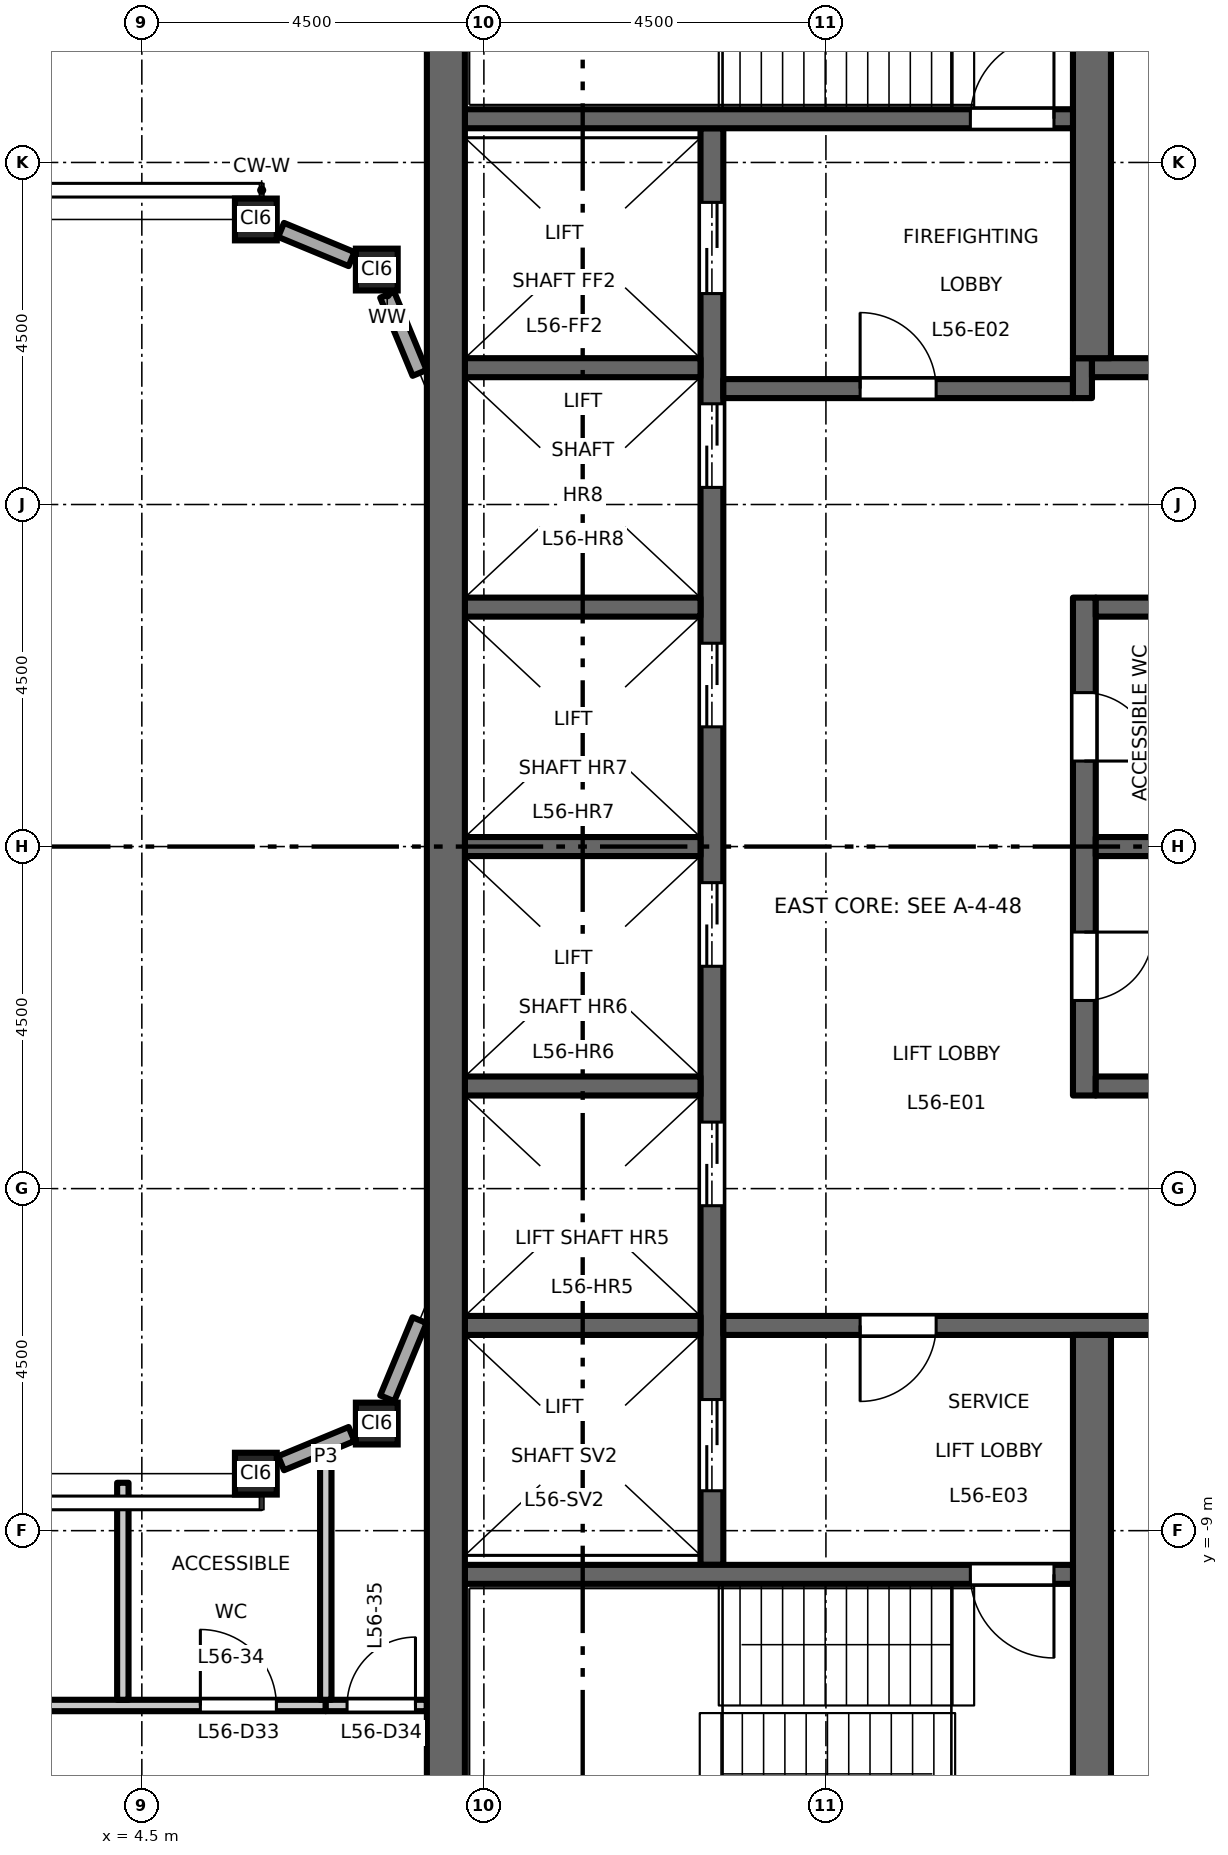
"""IFC4 building model, lengths in metres.
Left out: names, types, materials, properties, quantities, classifications, styles, units other than length and angle.
Written with IfcOpenShell. Run it as: python <this file> out.ifc"""

import sys

from ifc_helpers import new_model, si_unit, direction, frame, frame_2d, origin, origin_2d, place, context, subcontext, project, spatial, rectangle, hollow_rectangle, extrude, element, fill, save


model = new_model("IFC4")
c1 = context("Model", 3, precision=1e-05, world=origin(), true_north=direction((0.0, 1.0)))
c2 = subcontext(c1, "Body", "Model", "MODEL_VIEW")
j1 = project(units=[si_unit("LENGTHUNIT", "METRE"), si_unit("PLANEANGLEUNIT", "RADIAN")], contexts=[c1])
p1 = place(None, origin())
s1 = spatial("IfcSite", under=j1, at=p1, CompositionType="ELEMENT")
p2 = place(p1, origin())
s2 = spatial("IfcBuilding", under=s1, at=p2, CompositionType="ELEMENT")
p3 = place(p2, frame((0.0, 0.0, 260.2)))
s3 = spatial("IfcBuildingStorey", under=s2, at=p3, CompositionType="ELEMENT", Elevation=260.2)
for number, where, z_axis, x_axis in (
    (1, (6.0, -8.25, 0.0), (0.0, 0.0, 1.0), (1.0, 0.0, 0.0)),
    (2, (7.591, -7.591, 0.0), (0.0, 0.0, 1.0), (1.0, 0.0, 0.0)),
    (3, (6.0, 8.25, 0.0), (0.0, 0.0, 1.0), (1.0, 0.0, 0.0)),
    (4, (7.591, 7.591, 0.0), (0.0, 0.0, 1.0), (1.0, 0.0, 0.0)),
):
    element("IfcColumn", number, at=place(p3, frame(where, z_axis=z_axis, x_axis=x_axis)), inside=s3, PredefinedType="COLUMN", context=c2, shape_type="SweptSolid", body=[
        extrude(hollow_rectangle(XDim=0.55, YDim=0.55, WallThickness=0.028, at=origin_2d()), origin(), (0.0, 0.0, 1.0), 4.5),
    ])
p4 = place(p3, frame((12.0, -9.45, 0.0), z_axis=(0.0, 0.0, 1.0), x_axis=(0.0, 1.0, 0.0)))
e5 = element("IfcWall", 5, at=p4, inside=s3, PredefinedType="SHEAR", context=c2, shape_type="SweptSolid", body=[
    extrude(rectangle(XDim=18.9, YDim=0.3, at=frame_2d((9.45, 0.0))), origin(), (0.0, 0.0, 1.0), 4.35),
])
p5 = place(p4, frame((4.725, 0.0, 0.0)))
e6 = element("IfcOpeningElement", 6, at=p5, cuts=e5, PredefinedType="OPENING", context=c2, shape_type="SweptSolid", body=[
    extrude(rectangle(XDim=1.1, YDim=2.1, at=frame_2d((0.55, 1.05))), frame((0.0, 0.16, 0.0), z_axis=(0.0, -1.0, 0.0), x_axis=(1.0, 0.0, 0.0)), (0.0, 0.0, 1.0), 0.32),
])
p6 = place(p4, frame((7.875, 0.0, 0.0)))
e7 = element("IfcOpeningElement", 7, at=p6, cuts=e5, PredefinedType="OPENING", context=c2, shape_type="SweptSolid", body=[
    extrude(rectangle(XDim=1.1, YDim=2.1, at=frame_2d((0.55, 1.05))), frame((0.0, 0.16, 0.0), z_axis=(0.0, -1.0, 0.0), x_axis=(1.0, 0.0, 0.0)), (0.0, 0.0, 1.0), 0.32),
])
p7 = place(p4, frame((11.025, 0.0, 0.0)))
e8 = element("IfcOpeningElement", 8, at=p7, cuts=e5, PredefinedType="OPENING", context=c2, shape_type="SweptSolid", body=[
    extrude(rectangle(XDim=1.1, YDim=2.1, at=frame_2d((0.55, 1.05))), frame((0.0, 0.16, 0.0), z_axis=(0.0, -1.0, 0.0), x_axis=(1.0, 0.0, 0.0)), (0.0, 0.0, 1.0), 0.32),
])
p8 = place(p4, frame((14.175, 0.0, 0.0)))
e9 = element("IfcOpeningElement", 9, at=p8, cuts=e5, PredefinedType="OPENING", context=c2, shape_type="SweptSolid", body=[
    extrude(rectangle(XDim=1.1, YDim=2.1, at=frame_2d((0.55, 1.05))), frame((0.0, 0.16, 0.0), z_axis=(0.0, -1.0, 0.0), x_axis=(1.0, 0.0, 0.0)), (0.0, 0.0, 1.0), 0.32),
])
p9 = place(p4, frame((16.725, 0.0, 0.0)))
e10 = element("IfcOpeningElement", 10, at=p9, cuts=e5, PredefinedType="OPENING", context=c2, shape_type="SweptSolid", body=[
    extrude(rectangle(XDim=1.2, YDim=2.1, at=frame_2d((0.6, 1.05))), frame((0.0, 0.16, 0.0), z_axis=(0.0, -1.0, 0.0), x_axis=(1.0, 0.0, 0.0)), (0.0, 0.0, 1.0), 0.32),
])
p10 = place(p4, frame((0.975, 0.0, 0.0)))
e11 = element("IfcOpeningElement", 11, at=p10, cuts=e5, PredefinedType="OPENING", context=c2, shape_type="SweptSolid", body=[
    extrude(rectangle(XDim=1.2, YDim=2.1, at=frame_2d((0.6, 1.05))), frame((0.0, 0.16, 0.0), z_axis=(0.0, -1.0, 0.0), x_axis=(1.0, 0.0, 0.0)), (0.0, 0.0, 1.0), 0.32),
])
p11 = place(p3, frame((12.15, 6.025, 0.0), z_axis=(0.0, 0.0, 1.0), x_axis=(1.0, 0.0, 0.0)))
e12 = element("IfcWall", 12, at=p11, inside=s3, PredefinedType="SHEAR", context=c2, shape_type="SweptSolid", body=[
    extrude(rectangle(XDim=4.6, YDim=0.25, at=frame_2d((2.3, 0.0))), origin(), (0.0, 0.0, 1.0), 4.35),
])
p12 = place(p11, frame((1.8, 0.0, 0.0)))
e13 = element("IfcOpeningElement", 13, at=p12, cuts=e12, PredefinedType="OPENING", context=c2, shape_type="SweptSolid", body=[
    extrude(rectangle(XDim=1.0, YDim=2.1, at=frame_2d((0.5, 1.05))), frame((0.0, 0.135, 0.0), z_axis=(0.0, -1.0, 0.0), x_axis=(1.0, 0.0, 0.0)), (0.0, 0.0, 1.0), 0.27),
])
p13 = place(p3, frame((16.875, 5.9, 0.0), z_axis=(0.0, 0.0, 1.0), x_axis=(0.0, 1.0, 0.0)))
e14 = element("IfcWall", 14, at=p13, inside=s3, PredefinedType="SHEAR", context=c2, shape_type="SweptSolid", body=[
    extrude(rectangle(XDim=0.525, YDim=0.25, at=frame_2d((0.263, 0.0))), origin(), (0.0, 0.0, 1.0), 4.35),
])
p14 = place(p3, frame((17.0, 6.3, 0.0), z_axis=(0.0, 0.0, 1.0), x_axis=(1.0, 0.0, 0.0)))
e15 = element("IfcWall", 15, at=p14, inside=s3, PredefinedType="SHEAR", context=c2, shape_type="SweptSolid", body=[
    extrude(rectangle(XDim=4.25, YDim=0.25, at=frame_2d((2.125, 0.0))), origin(), (0.0, 0.0, 1.0), 4.35),
])
p15 = place(p3, frame((12.15, -6.3, 0.0), z_axis=(0.0, 0.0, 1.0), x_axis=(1.0, 0.0, 0.0)))
e16 = element("IfcWall", 16, at=p15, inside=s3, PredefinedType="SHEAR", context=c2, shape_type="SweptSolid", body=[
    extrude(rectangle(XDim=9.1, YDim=0.25, at=frame_2d((4.55, 0.0))), origin(), (0.0, 0.0, 1.0), 4.35),
])
p16 = place(p15, frame((1.8, 0.0, 0.0)))
e17 = element("IfcOpeningElement", 17, at=p16, cuts=e16, PredefinedType="OPENING", context=c2, shape_type="SweptSolid", body=[
    extrude(rectangle(XDim=1.0, YDim=2.1, at=frame_2d((0.5, 1.05))), frame((0.0, 0.135, 0.0), z_axis=(0.0, -1.0, 0.0), x_axis=(1.0, 0.0, 0.0)), (0.0, 0.0, 1.0), 0.27),
])
p17 = place(p3, frame((16.9, -3.275, 0.0), z_axis=(0.0, 0.0, 1.0), x_axis=(0.0, 1.0, 0.0)))
e18 = element("IfcWall", 18, at=p17, inside=s3, PredefinedType="SHEAR", context=c2, shape_type="SweptSolid", body=[
    extrude(rectangle(XDim=6.55, YDim=0.3, at=frame_2d((3.275, 0.0))), origin(), (0.0, 0.0, 1.0), 4.35),
])
p18 = place(p17, frame((1.25, 0.0, 0.0)))
e19 = element("IfcOpeningElement", 19, at=p18, cuts=e18, PredefinedType="OPENING", context=c2, shape_type="SweptSolid", body=[
    extrude(rectangle(XDim=0.9, YDim=2.1, at=frame_2d((0.45, 1.05))), frame((0.0, 0.16, 0.0), z_axis=(0.0, -1.0, 0.0), x_axis=(1.0, 0.0, 0.0)), (0.0, 0.0, 1.0), 0.32),
])
p19 = place(p17, frame((4.4, 0.0, 0.0)))
e20 = element("IfcOpeningElement", 20, at=p19, cuts=e18, PredefinedType="OPENING", context=c2, shape_type="SweptSolid", body=[
    extrude(rectangle(XDim=0.9, YDim=2.1, at=frame_2d((0.45, 1.05))), frame((0.0, 0.16, 0.0), z_axis=(0.0, -1.0, 0.0), x_axis=(1.0, 0.0, 0.0)), (0.0, 0.0, 1.0), 0.32),
])
for number, where, z_axis, x_axis in (
    (21, (17.05, 0.0, 0.0), (0.0, 0.0, 1.0), (1.0, 0.0, 0.0)),
    (22, (17.05, 3.15, 0.0), (0.0, 0.0, 1.0), (1.0, 0.0, 0.0)),
    (23, (17.05, -3.15, 0.0), (0.0, 0.0, 1.0), (1.0, 0.0, 0.0)),
):
    element("IfcWall", number, at=place(p3, frame(where, z_axis=z_axis, x_axis=x_axis)), inside=s3, PredefinedType="SHEAR", context=c2, shape_type="SweptSolid", body=[
        extrude(rectangle(XDim=4.2, YDim=0.25, at=frame_2d((2.1, 0.0))), origin(), (0.0, 0.0, 1.0), 4.35),
    ])
for number, where, z_axis, x_axis in (
    (24, (17.0, 6.425, 0.0), (0.0, 0.0, 1.0), (0.0, 1.0, 0.0)),
    (25, (17.0, -13.0, 0.0), (0.0, 0.0, 1.0), (0.0, 1.0, 0.0)),
):
    element("IfcWall", number, at=place(p3, frame(where, z_axis=z_axis, x_axis=x_axis)), inside=s3, PredefinedType="SHEAR", context=c2, shape_type="SweptSolid", body=[
        extrude(rectangle(XDim=6.575, YDim=0.5, at=frame_2d((3.288, 0.0))), origin(), (0.0, 0.0, 1.0), 4.35),
    ])
for number, where, z_axis, x_axis in (
    (26, (8.75, 0.0, 0.0), (0.0, 0.0, 1.0), (1.0, 0.0, 0.0)),
    (27, (8.75, 3.15, 0.0), (0.0, 0.0, 1.0), (1.0, 0.0, 0.0)),
    (28, (8.75, 6.3, 0.0), (0.0, 0.0, 1.0), (1.0, 0.0, 0.0)),
    (29, (8.75, -3.15, 0.0), (0.0, 0.0, 1.0), (1.0, 0.0, 0.0)),
    (30, (8.75, -6.3, 0.0), (0.0, 0.0, 1.0), (1.0, 0.0, 0.0)),
):
    element("IfcWall", number, at=place(p3, frame(where, z_axis=z_axis, x_axis=x_axis)), inside=s3, PredefinedType="SHEAR", context=c2, shape_type="SweptSolid", body=[
        extrude(rectangle(XDim=3.1, YDim=0.25, at=frame_2d((1.55, 0.0))), origin(), (0.0, 0.0, 1.0), 4.35),
    ])
p20 = place(p3, frame((8.75, 9.575, 0.0), z_axis=(0.0, 0.0, 1.0), x_axis=(1.0, 0.0, 0.0)))
e31 = element("IfcWall", 31, at=p20, inside=s3, PredefinedType="SHEAR", context=c2, shape_type="SweptSolid", body=[
    extrude(rectangle(XDim=8.0, YDim=0.25, at=frame_2d((4.0, 0.0))), origin(), (0.0, 0.0, 1.0), 4.35),
])
p21 = place(p20, frame((6.65, 0.0, 0.0)))
e32 = element("IfcOpeningElement", 32, at=p21, cuts=e31, PredefinedType="OPENING", context=c2, shape_type="SweptSolid", body=[
    extrude(rectangle(XDim=1.1, YDim=2.1, at=frame_2d((0.55, 1.05))), frame((0.0, 0.135, 0.0), z_axis=(0.0, -1.0, 0.0), x_axis=(1.0, 0.0, 0.0)), (0.0, 0.0, 1.0), 0.27),
])
p22 = place(p3, frame((8.75, -9.575, 0.0), z_axis=(0.0, 0.0, 1.0), x_axis=(1.0, 0.0, 0.0)))
e33 = element("IfcWall", 33, at=p22, inside=s3, PredefinedType="SHEAR", context=c2, shape_type="SweptSolid", body=[
    extrude(rectangle(XDim=8.0, YDim=0.25, at=frame_2d((4.0, 0.0))), origin(), (0.0, 0.0, 1.0), 4.35),
])
p23 = place(p22, frame((6.65, 0.0, 0.0)))
e34 = element("IfcOpeningElement", 34, at=p23, cuts=e33, PredefinedType="OPENING", context=c2, shape_type="SweptSolid", body=[
    extrude(rectangle(XDim=1.1, YDim=2.1, at=frame_2d((0.55, 1.05))), frame((0.0, 0.135, 0.0), z_axis=(0.0, -1.0, 0.0), x_axis=(1.0, 0.0, 0.0)), (0.0, 0.0, 1.0), 0.27),
])
p24 = place(p3, frame((8.5, -13.0, 0.0), z_axis=(0.0, 0.0, 1.0), x_axis=(0.0, 1.0, 0.0)))
e35 = element("IfcWall", 35, at=p24, inside=s3, PredefinedType="SHEAR", context=c2, shape_type="SweptSolid", body=[
    extrude(rectangle(XDim=26.0, YDim=0.5, at=frame_2d((13.0, 0.0))), origin(), (0.0, 0.0, 1.0), 4.35),
])
p25 = place(p3, frame((6.332, -8.113, 0.0), z_axis=(0.0, 0.0, 1.0), x_axis=(0.923859650767, 0.382731427616, 0.0)))
e36 = element("IfcWall", 36, at=p25, inside=s3, PredefinedType="STANDARD", context=c2, shape_type="SweptSolid", body=[
    extrude(rectangle(XDim=1.003, YDim=0.2, at=frame_2d((0.502, 0.0))), origin(), (0.0, 0.0, 1.0), 3.918),
])
for number, where, z_axis, x_axis in (
    (37, (7.729, -7.259, 0.0), (0.0, 0.0, 1.0), (0.383, 0.924, 0.0)),
    (38, (8.154, 6.231, 0.0), (0.0, 0.0, 1.0), (-0.383, 0.924, 0.0)),
):
    element("IfcWall", number, at=place(p3, frame(where, z_axis=z_axis, x_axis=x_axis)), inside=s3, PredefinedType="STANDARD", context=c2, shape_type="SweptSolid", body=[
        extrude(rectangle(XDim=1.113, YDim=0.2, at=frame_2d((0.556, 0.0))), origin(), (0.0, 0.0, 1.0), 3.918),
    ])
p26 = place(p3, frame((7.259, 7.729, 0.0), z_axis=(0.0, 0.0, 1.0), x_axis=(-0.923859650767, 0.382731427616, 0.0)))
e39 = element("IfcWall", 39, at=p26, inside=s3, PredefinedType="STANDARD", context=c2, shape_type="SweptSolid", body=[
    extrude(rectangle(XDim=1.003, YDim=0.2, at=frame_2d((0.502, 0.0))), origin(), (0.0, 0.0, 1.0), 3.918),
])
p27 = place(p3, frame((-8.25, -11.3, 0.0), z_axis=(0.0, 0.0, 1.0), x_axis=(1.0, 0.0, 0.0)))
e40 = element("IfcWall", 40, at=p27, inside=s3, PredefinedType="PARTITIONING", context=c2, shape_type="SweptSolid", body=[
    extrude(rectangle(XDim=15.17, YDim=0.15, at=frame_2d((7.585, 0.0))), origin(), (0.0, 0.0, 1.0), 4.35),
])
p28 = place(p27, frame((4.6, 0.0, 0.0)))
e41 = element("IfcOpeningElement", 41, at=p28, cuts=e40, PredefinedType="OPENING", context=c2, shape_type="SweptSolid", body=[
    extrude(rectangle(XDim=1.0, YDim=2.1, at=frame_2d((0.5, 1.05))), frame((0.0, 0.085, 0.0), z_axis=(0.0, -1.0, 0.0), x_axis=(1.0, 0.0, 0.0)), (0.0, 0.0, 1.0), 0.17),
])
p29 = place(p27, frame((6.85, 0.0, 0.0)))
e42 = element("IfcOpeningElement", 42, at=p29, cuts=e40, PredefinedType="OPENING", context=c2, shape_type="SweptSolid", body=[
    extrude(rectangle(XDim=1.0, YDim=2.1, at=frame_2d((0.5, 1.05))), frame((0.0, 0.085, 0.0), z_axis=(0.0, -1.0, 0.0), x_axis=(1.0, 0.0, 0.0)), (0.0, 0.0, 1.0), 0.17),
])
p30 = place(p27, frame((13.52, 0.0, 0.0)))
e43 = element("IfcOpeningElement", 43, at=p30, cuts=e40, PredefinedType="OPENING", context=c2, shape_type="SweptSolid", body=[
    extrude(rectangle(XDim=1.0, YDim=2.1, at=frame_2d((0.5, 1.05))), frame((0.0, 0.085, 0.0), z_axis=(0.0, -1.0, 0.0), x_axis=(1.0, 0.0, 0.0)), (0.0, 0.0, 1.0), 0.17),
])
p31 = place(p3, frame((6.92, -11.3, 0.0), z_axis=(0.0, 0.0, 1.0), x_axis=(1.0, 0.0, 0.0)))
e44 = element("IfcWall", 44, at=p31, inside=s3, PredefinedType="PARTITIONING", context=c2, shape_type="SweptSolid", body=[
    extrude(rectangle(XDim=1.33, YDim=0.15, at=frame_2d((0.665, 0.0))), origin(), (0.0, 0.0, 1.0), 4.35),
])
p32 = place(p31, frame((0.28, 0.0, 0.0)))
e45 = element("IfcOpeningElement", 45, at=p32, cuts=e44, PredefinedType="OPENING", context=c2, shape_type="SweptSolid", body=[
    extrude(rectangle(XDim=0.9, YDim=2.1, at=frame_2d((0.45, 1.05))), frame((0.0, 0.085, 0.0), z_axis=(0.0, -1.0, 0.0), x_axis=(1.0, 0.0, 0.0)), (0.0, 0.0, 1.0), 0.17),
])
p33 = place(p3, frame((4.25, -11.225, 0.0), z_axis=(0.0, 0.0, 1.0), x_axis=(0.0, 1.0, 0.0)))
e46 = element("IfcWall", 46, at=p33, inside=s3, PredefinedType="PARTITIONING", context=c2, shape_type="SweptSolid", body=[
    extrude(rectangle(XDim=2.855, YDim=0.15, at=frame_2d((1.427, 0.0))), origin(), (0.0, 0.0, 1.0), 4.35),
])
p34 = place(p3, frame((6.92, -11.225, 0.0), z_axis=(0.0, 0.0, 1.0), x_axis=(0.0, 1.0, 0.0)))
e47 = element("IfcWall", 47, at=p34, inside=s3, PredefinedType="PARTITIONING", context=c2, shape_type="SweptSolid", body=[
    extrude(rectangle(XDim=3.196, YDim=0.15, at=frame_2d((1.598, 0.0))), origin(), (0.0, 0.0, 1.0), 4.35),
])
p35 = place(p12, origin())
e48 = element("IfcDoor", 48, at=p35, inside=s3, OperationType="SINGLE_SWING_RIGHT", PredefinedType="DOOR", context=c2, shape_type="SweptSolid", body=[
    extrude(rectangle(XDim=1.0, YDim=2.1, at=frame_2d((0.5, 1.05))), frame((0.0, 0.025, 0.0), z_axis=(0.0, -1.0, 0.0), x_axis=(1.0, 0.0, 0.0)), (0.0, 0.0, 1.0), 0.05),
])
fill(e13, e48)
p36 = place(p16, origin())
e49 = element("IfcDoor", 49, at=p36, inside=s3, OperationType="SINGLE_SWING_LEFT", PredefinedType="DOOR", context=c2, shape_type="SweptSolid", body=[
    extrude(rectangle(XDim=1.0, YDim=2.1, at=frame_2d((0.5, 1.05))), frame((0.0, 0.025, 0.0), z_axis=(0.0, -1.0, 0.0), x_axis=(1.0, 0.0, 0.0)), (0.0, 0.0, 1.0), 0.05),
])
fill(e17, e49)
p37 = place(p21, origin())
e50 = element("IfcDoor", 50, at=p37, inside=s3, OperationType="SINGLE_SWING_LEFT", PredefinedType="DOOR", context=c2, shape_type="SweptSolid", body=[
    extrude(rectangle(XDim=1.1, YDim=2.1, at=frame_2d((0.55, 1.05))), frame((0.0, 0.025, 0.0), z_axis=(0.0, -1.0, 0.0), x_axis=(1.0, 0.0, 0.0)), (0.0, 0.0, 1.0), 0.05),
])
fill(e32, e50)
p38 = place(p23, origin())
e51 = element("IfcDoor", 51, at=p38, inside=s3, OperationType="SINGLE_SWING_RIGHT", PredefinedType="DOOR", context=c2, shape_type="SweptSolid", body=[
    extrude(rectangle(XDim=1.1, YDim=2.1, at=frame_2d((0.55, 1.05))), frame((0.0, 0.025, 0.0), z_axis=(0.0, -1.0, 0.0), x_axis=(1.0, 0.0, 0.0)), (0.0, 0.0, 1.0), 0.05),
])
fill(e34, e51)
p39 = place(p5, origin())
e52 = element("IfcDoor", 52, at=p39, inside=s3, OperationType="DOUBLE_DOOR_SLIDING", PredefinedType="DOOR", context=c2, shape_type="SweptSolid", body=[
    extrude(rectangle(XDim=1.1, YDim=2.1, at=frame_2d((0.55, 1.05))), frame((0.0, 0.025, 0.0), z_axis=(0.0, -1.0, 0.0), x_axis=(1.0, 0.0, 0.0)), (0.0, 0.0, 1.0), 0.05),
])
fill(e6, e52)
p40 = place(p6, origin())
e53 = element("IfcDoor", 53, at=p40, inside=s3, OperationType="DOUBLE_DOOR_SLIDING", PredefinedType="DOOR", context=c2, shape_type="SweptSolid", body=[
    extrude(rectangle(XDim=1.1, YDim=2.1, at=frame_2d((0.55, 1.05))), frame((0.0, 0.025, 0.0), z_axis=(0.0, -1.0, 0.0), x_axis=(1.0, 0.0, 0.0)), (0.0, 0.0, 1.0), 0.05),
])
fill(e7, e53)
p41 = place(p7, origin())
e54 = element("IfcDoor", 54, at=p41, inside=s3, OperationType="DOUBLE_DOOR_SLIDING", PredefinedType="DOOR", context=c2, shape_type="SweptSolid", body=[
    extrude(rectangle(XDim=1.1, YDim=2.1, at=frame_2d((0.55, 1.05))), frame((0.0, 0.025, 0.0), z_axis=(0.0, -1.0, 0.0), x_axis=(1.0, 0.0, 0.0)), (0.0, 0.0, 1.0), 0.05),
])
fill(e8, e54)
p42 = place(p8, origin())
e55 = element("IfcDoor", 55, at=p42, inside=s3, OperationType="DOUBLE_DOOR_SLIDING", PredefinedType="DOOR", context=c2, shape_type="SweptSolid", body=[
    extrude(rectangle(XDim=1.1, YDim=2.1, at=frame_2d((0.55, 1.05))), frame((0.0, 0.025, 0.0), z_axis=(0.0, -1.0, 0.0), x_axis=(1.0, 0.0, 0.0)), (0.0, 0.0, 1.0), 0.05),
])
fill(e9, e55)
p43 = place(p9, origin())
e56 = element("IfcDoor", 56, at=p43, inside=s3, OperationType="DOUBLE_DOOR_SLIDING", PredefinedType="DOOR", context=c2, shape_type="SweptSolid", body=[
    extrude(rectangle(XDim=1.2, YDim=2.1, at=frame_2d((0.6, 1.05))), frame((0.0, 0.025, 0.0), z_axis=(0.0, -1.0, 0.0), x_axis=(1.0, 0.0, 0.0)), (0.0, 0.0, 1.0), 0.05),
])
fill(e10, e56)
p44 = place(p10, origin())
e57 = element("IfcDoor", 57, at=p44, inside=s3, OperationType="DOUBLE_DOOR_SLIDING", PredefinedType="DOOR", context=c2, shape_type="SweptSolid", body=[
    extrude(rectangle(XDim=1.2, YDim=2.1, at=frame_2d((0.6, 1.05))), frame((0.0, 0.025, 0.0), z_axis=(0.0, -1.0, 0.0), x_axis=(1.0, 0.0, 0.0)), (0.0, 0.0, 1.0), 0.05),
])
fill(e11, e57)
p45 = place(p18, origin())
e58 = element("IfcDoor", 58, at=p45, inside=s3, OperationType="SINGLE_SWING_RIGHT", PredefinedType="DOOR", context=c2, shape_type="SweptSolid", body=[
    extrude(rectangle(XDim=0.9, YDim=2.1, at=frame_2d((0.45, 1.05))), frame((0.0, 0.025, 0.0), z_axis=(0.0, -1.0, 0.0), x_axis=(1.0, 0.0, 0.0)), (0.0, 0.0, 1.0), 0.05),
])
fill(e19, e58)
p46 = place(p19, origin())
e59 = element("IfcDoor", 59, at=p46, inside=s3, OperationType="SINGLE_SWING_LEFT", PredefinedType="DOOR", context=c2, shape_type="SweptSolid", body=[
    extrude(rectangle(XDim=0.9, YDim=2.1, at=frame_2d((0.45, 1.05))), frame((0.0, 0.025, 0.0), z_axis=(0.0, -1.0, 0.0), x_axis=(1.0, 0.0, 0.0)), (0.0, 0.0, 1.0), 0.05),
])
fill(e20, e59)
p47 = place(p30, origin())
e60 = element("IfcDoor", 60, at=p47, inside=s3, OperationType="SINGLE_SWING_LEFT", PredefinedType="DOOR", context=c2, shape_type="SweptSolid", body=[
    extrude(rectangle(XDim=1.0, YDim=2.1, at=frame_2d((0.5, 1.05))), frame((0.0, 0.025, 0.0), z_axis=(0.0, -1.0, 0.0), x_axis=(1.0, 0.0, 0.0)), (0.0, 0.0, 1.0), 0.05),
])
fill(e43, e60)
p48 = place(p32, origin())
e61 = element("IfcDoor", 61, at=p48, inside=s3, OperationType="SINGLE_SWING_RIGHT", PredefinedType="DOOR", context=c2, shape_type="SweptSolid", body=[
    extrude(rectangle(XDim=0.9, YDim=2.1, at=frame_2d((0.45, 1.05))), frame((0.0, 0.025, 0.0), z_axis=(0.0, -1.0, 0.0), x_axis=(1.0, 0.0, 0.0)), (0.0, 0.0, 1.0), 0.05),
])
fill(e45, e61)
save(model, sys.argv[1])
